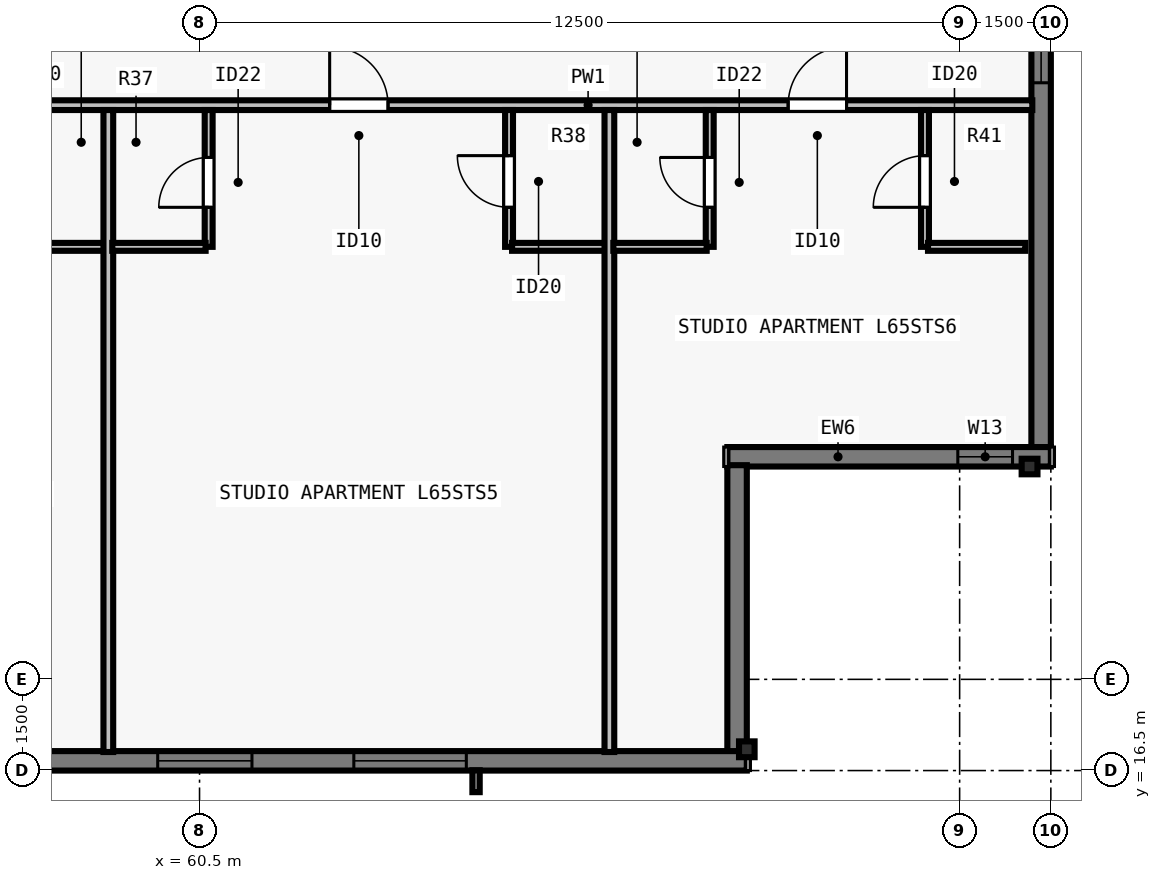
"""IFC4 building model, lengths in metres.
Left out: names, types, materials, properties, quantities, classifications, styles, units other than length and angle.
Written with IfcOpenShell. Run it as: python <this file> out.ifc"""

import sys

from ifc_helpers import new_model, si_unit, direction, frame, frame_2d, origin, origin_2d, place, context, subcontext, project, spatial, rectangle, i_section, extrude, element, fill, save


model = new_model("IFC4")
c1 = context("Model", 3, precision=1e-05, world=origin(), true_north=direction((0.0, 1.0)))
c2 = subcontext(c1, "Body", "Model", "MODEL_VIEW")
j1 = project(units=[si_unit("LENGTHUNIT", "METRE"), si_unit("PLANEANGLEUNIT", "RADIAN")], contexts=[c1])
p1 = place(None, origin())
s1 = spatial("IfcSite", under=j1, at=p1, CompositionType="ELEMENT")
p2 = place(p1, origin())
s2 = spatial("IfcBuilding", under=s1, at=p2, CompositionType="ELEMENT")
p3 = place(p2, frame((0.0, 0.0, 237.5)))
s3 = spatial("IfcBuildingStorey", under=s2, at=p3, CompositionType="ELEMENT", Elevation=237.5)
for number, where, z_axis, x_axis in (
    (1, (69.5, 16.85, 0.0), (0.0, 0.0, 1.0), (1.0, 0.0, 0.0)),
    (2, (74.15, 21.5, 0.0), (0.0, 0.0, 1.0), (0.0, 1.0, 0.0)),
):
    element("IfcColumn", number, at=place(p3, frame(where, z_axis=z_axis, x_axis=x_axis)), inside=s3, PredefinedType="COLUMN", context=c2, shape_type="SweptSolid", body=[
        extrude(i_section(OverallWidth=0.256, OverallDepth=0.26, WebThickness=0.01, FlangeThickness=0.017, FilletRadius=0.013, at=origin_2d()), origin(), (0.0, 0.0, 1.0), 3.5),
    ])
p4 = place(p3, frame((74.34, 56.5, 0.0), z_axis=(0.0, 0.0, 1.0), x_axis=(0.0, -1.0, 0.0)))
e3 = element("IfcWall", 3, at=p4, inside=s3, PredefinedType="SOLIDWALL", context=c2, shape_type="SweptSolid", body=[
    extrude(rectangle(XDim=34.702, YDim=0.32, at=frame_2d((17.351, 0.0))), origin(), (0.0, 0.0, 1.0), 3.29),
])
p5 = place(p4, frame((6.888, 0.0, 0.8)))
e4 = element("IfcOpeningElement", 4, at=p5, cuts=e3, PredefinedType="OPENING", context=c2, shape_type="SweptSolid", body=[
    extrude(rectangle(XDim=1.55, YDim=1.678, at=frame_2d((0.775, 0.839))), frame((0.0, 0.17, 0.0), z_axis=(0.0, -1.0, 0.0), x_axis=(1.0, 0.0, 0.0)), (0.0, 0.0, 1.0), 0.34),
])
p6 = place(p4, frame((10.113, 0.0, 0.8)))
e5 = element("IfcOpeningElement", 5, at=p6, cuts=e3, PredefinedType="OPENING", context=c2, shape_type="SweptSolid", body=[
    extrude(rectangle(XDim=1.85, YDim=1.678, at=frame_2d((0.925, 0.839))), frame((0.0, 0.17, 0.0), z_axis=(0.0, -1.0, 0.0), x_axis=(1.0, 0.0, 0.0)), (0.0, 0.0, 1.0), 0.34),
])
p7 = place(p4, frame((14.888, 0.0, 0.8)))
e6 = element("IfcOpeningElement", 6, at=p7, cuts=e3, PredefinedType="OPENING", context=c2, shape_type="SweptSolid", body=[
    extrude(rectangle(XDim=1.55, YDim=1.678, at=frame_2d((0.775, 0.839))), frame((0.0, 0.17, 0.0), z_axis=(0.0, -1.0, 0.0), x_axis=(1.0, 0.0, 0.0)), (0.0, 0.0, 1.0), 0.34),
])
p8 = place(p4, frame((18.114, 0.0, 0.8)))
e7 = element("IfcOpeningElement", 7, at=p8, cuts=e3, PredefinedType="OPENING", context=c2, shape_type="SweptSolid", body=[
    extrude(rectangle(XDim=1.85, YDim=1.678, at=frame_2d((0.925, 0.839))), frame((0.0, 0.17, 0.0), z_axis=(0.0, -1.0, 0.0), x_axis=(1.0, 0.0, 0.0)), (0.0, 0.0, 1.0), 0.34),
])
p9 = place(p4, frame((23.614, 0.0, 0.8)))
e8 = element("IfcOpeningElement", 8, at=p9, cuts=e3, PredefinedType="OPENING", context=c2, shape_type="SweptSolid", body=[
    extrude(rectangle(XDim=1.85, YDim=1.678, at=frame_2d((0.925, 0.839))), frame((0.0, 0.17, 0.0), z_axis=(0.0, -1.0, 0.0), x_axis=(1.0, 0.0, 0.0)), (0.0, 0.0, 1.0), 0.34),
])
p10 = place(p4, frame((27.139, 0.0, 0.8)))
e9 = element("IfcOpeningElement", 9, at=p10, cuts=e3, PredefinedType="OPENING", context=c2, shape_type="SweptSolid", body=[
    extrude(rectangle(XDim=1.55, YDim=1.678, at=frame_2d((0.775, 0.839))), frame((0.0, 0.17, 0.0), z_axis=(0.0, -1.0, 0.0), x_axis=(1.0, 0.0, 0.0)), (0.0, 0.0, 1.0), 0.34),
])
p11 = place(p3, frame((74.5, 21.66, 0.0), z_axis=(0.0, 0.0, 1.0), x_axis=(-1.0, 0.0, 0.0)))
e10 = element("IfcWall", 10, at=p11, inside=s3, PredefinedType="SOLIDWALL", context=c2, shape_type="SweptSolid", body=[
    extrude(rectangle(XDim=5.32, YDim=0.32, at=frame_2d((2.66, 0.0))), origin(), (0.0, 0.0, 1.0), 3.29),
])
p12 = place(p11, frame((0.63, 0.0, 0.8)))
e11 = element("IfcOpeningElement", 11, at=p12, cuts=e10, PredefinedType="OPENING", context=c2, shape_type="SweptSolid", body=[
    extrude(rectangle(XDim=0.9, YDim=1.678, at=frame_2d((0.45, 0.839))), frame((0.0, 0.17, 0.0), z_axis=(0.0, -1.0, 0.0), x_axis=(1.0, 0.0, 0.0)), (0.0, 0.0, 1.0), 0.34),
])
p13 = place(p3, frame((69.34, 21.522, 0.0), z_axis=(0.0, 0.0, 1.0), x_axis=(0.0, -1.0, 0.0)))
e12 = element("IfcWall", 12, at=p13, inside=s3, PredefinedType="SOLIDWALL", context=c2, shape_type="SweptSolid", body=[
    extrude(rectangle(XDim=4.724, YDim=0.32, at=frame_2d((2.362, 0.0))), origin(), (0.0, 0.0, 1.0), 3.29),
])
p14 = place(p3, frame((69.5, 16.66, 0.0), z_axis=(0.0, 0.0, 1.0), x_axis=(-1.0, 0.0, 0.0)))
e13 = element("IfcWall", 13, at=p14, inside=s3, PredefinedType="SOLIDWALL", context=c2, shape_type="SweptSolid", body=[
    extrude(rectangle(XDim=34.702, YDim=0.32, at=frame_2d((17.351, 0.0))), origin(), (0.0, 0.0, 1.0), 3.29),
])
p15 = place(p14, frame((4.613, 0.0, 0.8)))
e14 = element("IfcOpeningElement", 14, at=p15, cuts=e13, PredefinedType="OPENING", context=c2, shape_type="SweptSolid", body=[
    extrude(rectangle(XDim=1.85, YDim=1.678, at=frame_2d((0.925, 0.839))), frame((0.0, 0.17, 0.0), z_axis=(0.0, -1.0, 0.0), x_axis=(1.0, 0.0, 0.0)), (0.0, 0.0, 1.0), 0.34),
])
p16 = place(p14, frame((8.138, 0.0, 0.8)))
e15 = element("IfcOpeningElement", 15, at=p16, cuts=e13, PredefinedType="OPENING", context=c2, shape_type="SweptSolid", body=[
    extrude(rectangle(XDim=1.55, YDim=1.678, at=frame_2d((0.775, 0.839))), frame((0.0, 0.17, 0.0), z_axis=(0.0, -1.0, 0.0), x_axis=(1.0, 0.0, 0.0)), (0.0, 0.0, 1.0), 0.34),
])
p17 = place(p14, frame((14.888, 0.0, 0.8)))
e16 = element("IfcOpeningElement", 16, at=p17, cuts=e13, PredefinedType="OPENING", context=c2, shape_type="SweptSolid", body=[
    extrude(rectangle(XDim=1.55, YDim=1.678, at=frame_2d((0.775, 0.839))), frame((0.0, 0.17, 0.0), z_axis=(0.0, -1.0, 0.0), x_axis=(1.0, 0.0, 0.0)), (0.0, 0.0, 1.0), 0.34),
])
p18 = place(p14, frame((18.114, 0.0, 0.8)))
e17 = element("IfcOpeningElement", 17, at=p18, cuts=e13, PredefinedType="OPENING", context=c2, shape_type="SweptSolid", body=[
    extrude(rectangle(XDim=1.85, YDim=1.678, at=frame_2d((0.925, 0.839))), frame((0.0, 0.17, 0.0), z_axis=(0.0, -1.0, 0.0), x_axis=(1.0, 0.0, 0.0)), (0.0, 0.0, 1.0), 0.34),
])
p19 = place(p14, frame((25.714, 0.0, 0.8)))
e18 = element("IfcOpeningElement", 18, at=p19, cuts=e13, PredefinedType="OPENING", context=c2, shape_type="SweptSolid", body=[
    extrude(rectangle(XDim=1.85, YDim=1.678, at=frame_2d((0.925, 0.839))), frame((0.0, 0.17, 0.0), z_axis=(0.0, -1.0, 0.0), x_axis=(1.0, 0.0, 0.0)), (0.0, 0.0, 1.0), 0.34),
])
p20 = place(p14, frame((28.389, 0.0, 0.8)))
e19 = element("IfcOpeningElement", 19, at=p20, cuts=e13, PredefinedType="OPENING", context=c2, shape_type="SweptSolid", body=[
    extrude(rectangle(XDim=1.55, YDim=1.678, at=frame_2d((0.775, 0.839))), frame((0.0, 0.17, 0.0), z_axis=(0.0, -1.0, 0.0), x_axis=(1.0, 0.0, 0.0)), (0.0, 0.0, 1.0), 0.34),
])
p21 = place(p3, frame((29.805, 27.442, 0.0), z_axis=(0.0, 0.0, 1.0), x_axis=(1.0, 0.0, 0.0)))
e20 = element("IfcWall", 20, at=p21, inside=s3, PredefinedType="PARTITIONING", context=c2, shape_type="SweptSolid", body=[
    extrude(rectangle(XDim=44.39, YDim=0.16, at=frame_2d((22.195, 0.0))), origin(), (0.0, 0.0, 1.0), 2.958),
])
p22 = place(p21, frame((3.575, 0.0, 0.0)))
e21 = element("IfcOpeningElement", 21, at=p22, cuts=e20, PredefinedType="OPENING", context=c2, shape_type="SweptSolid", body=[
    extrude(rectangle(XDim=0.96, YDim=2.18, at=frame_2d((0.48, 1.09))), frame((0.0, 0.09, 0.0), z_axis=(0.0, -1.0, 0.0), x_axis=(1.0, 0.0, 0.0)), (0.0, 0.0, 1.0), 0.18),
])
p23 = place(p21, frame((10.755, 0.0, 0.0)))
e22 = element("IfcOpeningElement", 22, at=p23, cuts=e20, PredefinedType="OPENING", context=c2, shape_type="SweptSolid", body=[
    extrude(rectangle(XDim=0.96, YDim=2.18, at=frame_2d((0.48, 1.09))), frame((0.0, 0.09, 0.0), z_axis=(0.0, -1.0, 0.0), x_axis=(1.0, 0.0, 0.0)), (0.0, 0.0, 1.0), 0.18),
])
p24 = place(p21, frame((18.115, 0.0, 0.0)))
e23 = element("IfcOpeningElement", 23, at=p24, cuts=e20, PredefinedType="OPENING", context=c2, shape_type="SweptSolid", body=[
    extrude(rectangle(XDim=0.96, YDim=2.18, at=frame_2d((0.48, 1.09))), frame((0.0, 0.09, 0.0), z_axis=(0.0, -1.0, 0.0), x_axis=(1.0, 0.0, 0.0)), (0.0, 0.0, 1.0), 0.18),
])
p25 = place(p21, frame((25.475, 0.0, 0.0)))
e24 = element("IfcOpeningElement", 24, at=p25, cuts=e20, PredefinedType="OPENING", context=c2, shape_type="SweptSolid", body=[
    extrude(rectangle(XDim=0.96, YDim=2.18, at=frame_2d((0.48, 1.09))), frame((0.0, 0.09, 0.0), z_axis=(0.0, -1.0, 0.0), x_axis=(1.0, 0.0, 0.0)), (0.0, 0.0, 1.0), 0.18),
])
p26 = place(p21, frame((32.835, 0.0, 0.0)))
e25 = element("IfcOpeningElement", 25, at=p26, cuts=e20, PredefinedType="OPENING", context=c2, shape_type="SweptSolid", body=[
    extrude(rectangle(XDim=0.96, YDim=2.18, at=frame_2d((0.48, 1.09))), frame((0.0, 0.09, 0.0), z_axis=(0.0, -1.0, 0.0), x_axis=(1.0, 0.0, 0.0)), (0.0, 0.0, 1.0), 0.18),
])
p27 = place(p21, frame((40.375, 0.0, 0.0)))
e26 = element("IfcOpeningElement", 26, at=p27, cuts=e20, PredefinedType="OPENING", context=c2, shape_type="SweptSolid", body=[
    extrude(rectangle(XDim=0.96, YDim=2.18, at=frame_2d((0.48, 1.09))), frame((0.0, 0.09, 0.0), z_axis=(0.0, -1.0, 0.0), x_axis=(1.0, 0.0, 0.0)), (0.0, 0.0, 1.0), 0.18),
])
p28 = place(p3, frame((57.4, 25.113, 0.0), z_axis=(0.0, 0.0, 1.0), x_axis=(1.0, 0.0, 0.0)))
e27 = element("IfcWall", 27, at=p28, inside=s3, PredefinedType="PLUMBINGWALL", context=c2, shape_type="SweptSolid", body=[
    extrude(rectangle(XDim=1.6, YDim=0.13, at=frame_2d((0.8, 0.0))), origin(), (0.0, 0.0, 1.0), 3.29),
])
p29 = place(p3, frame((59.0, 16.805, 0.0), z_axis=(0.0, 0.0, 1.0), x_axis=(0.0, 1.0, 0.0)))
e28 = element("IfcWall", 28, at=p29, inside=s3, PredefinedType="PARTITIONING", context=c2, shape_type="SweptSolid", body=[
    extrude(rectangle(XDim=10.558, YDim=0.16, at=frame_2d((5.279, 0.0))), origin(), (0.0, 0.0, 1.0), 3.29),
])
p30 = place(p3, frame((60.65, 25.113, 0.0), z_axis=(0.0, 0.0, 1.0), x_axis=(0.0, 1.0, 0.0)))
e29 = element("IfcWall", 29, at=p30, inside=s3, PredefinedType="PLUMBINGWALL", context=c2, shape_type="SweptSolid", body=[
    extrude(rectangle(XDim=2.25, YDim=0.13, at=frame_2d((1.125, 0.0))), origin(), (0.0, 0.0, 1.0), 3.29),
])
p31 = place(p30, frame((0.65, 0.0, 0.0)))
e30 = element("IfcOpeningElement", 30, at=p31, cuts=e29, PredefinedType="OPENING", context=c2, shape_type="SweptSolid", body=[
    extrude(rectangle(XDim=0.82, YDim=2.1, at=frame_2d((0.41, 1.05))), frame((0.0, 0.075, 0.0), z_axis=(0.0, -1.0, 0.0), x_axis=(1.0, 0.0, 0.0)), (0.0, 0.0, 1.0), 0.15),
])
p32 = place(p3, frame((59.065, 25.113, 0.0), z_axis=(0.0, 0.0, 1.0), x_axis=(1.0, 0.0, 0.0)))
e31 = element("IfcWall", 31, at=p32, inside=s3, PredefinedType="PLUMBINGWALL", context=c2, shape_type="SweptSolid", body=[
    extrude(rectangle(XDim=1.535, YDim=0.13, at=frame_2d((0.768, 0.0))), origin(), (0.0, 0.0, 1.0), 3.29),
])
p33 = place(p3, frame((65.59, 25.113, 0.0), z_axis=(0.0, 0.0, 1.0), x_axis=(0.0, 1.0, 0.0)))
e32 = element("IfcWall", 32, at=p33, inside=s3, PredefinedType="PLUMBINGWALL", context=c2, shape_type="SweptSolid", body=[
    extrude(rectangle(XDim=2.25, YDim=0.13, at=frame_2d((1.125, 0.0))), origin(), (0.0, 0.0, 1.0), 3.29),
])
p34 = place(p33, frame((0.65, 0.0, 0.0)))
e33 = element("IfcOpeningElement", 33, at=p34, cuts=e32, PredefinedType="OPENING", context=c2, shape_type="SweptSolid", body=[
    extrude(rectangle(XDim=0.85, YDim=2.1, at=frame_2d((0.425, 1.05))), frame((0.0, 0.075, 0.0), z_axis=(0.0, -1.0, 0.0), x_axis=(1.0, 0.0, 0.0)), (0.0, 0.0, 1.0), 0.15),
])
p35 = place(p3, frame((65.64, 25.113, 0.0), z_axis=(0.0, 0.0, 1.0), x_axis=(1.0, 0.0, 0.0)))
e34 = element("IfcWall", 34, at=p35, inside=s3, PredefinedType="PLUMBINGWALL", context=c2, shape_type="SweptSolid", body=[
    extrude(rectangle(XDim=1.6, YDim=0.13, at=frame_2d((0.8, 0.0))), origin(), (0.0, 0.0, 1.0), 3.29),
])
p36 = place(p3, frame((67.24, 16.805, 0.0), z_axis=(0.0, 0.0, 1.0), x_axis=(0.0, 1.0, 0.0)))
e35 = element("IfcWall", 35, at=p36, inside=s3, PredefinedType="PARTITIONING", context=c2, shape_type="SweptSolid", body=[
    extrude(rectangle(XDim=10.558, YDim=0.16, at=frame_2d((5.279, 0.0))), origin(), (0.0, 0.0, 1.0), 2.573),
])
p37 = place(p3, frame((68.89, 25.113, 0.0), z_axis=(0.0, 0.0, 1.0), x_axis=(0.0, 1.0, 0.0)))
e36 = element("IfcWall", 36, at=p37, inside=s3, PredefinedType="PLUMBINGWALL", context=c2, shape_type="SweptSolid", body=[
    extrude(rectangle(XDim=2.25, YDim=0.13, at=frame_2d((1.125, 0.0))), origin(), (0.0, 0.0, 1.0), 3.29),
])
p38 = place(p37, frame((0.65, 0.0, 0.0)))
e37 = element("IfcOpeningElement", 37, at=p38, cuts=e36, PredefinedType="OPENING", context=c2, shape_type="SweptSolid", body=[
    extrude(rectangle(XDim=0.82, YDim=2.1, at=frame_2d((0.41, 1.05))), frame((0.0, 0.075, 0.0), z_axis=(0.0, -1.0, 0.0), x_axis=(1.0, 0.0, 0.0)), (0.0, 0.0, 1.0), 0.15),
])
p39 = place(p3, frame((67.305, 25.113, 0.0), z_axis=(0.0, 0.0, 1.0), x_axis=(1.0, 0.0, 0.0)))
e38 = element("IfcWall", 38, at=p39, inside=s3, PredefinedType="PLUMBINGWALL", context=c2, shape_type="SweptSolid", body=[
    extrude(rectangle(XDim=1.535, YDim=0.13, at=frame_2d((0.768, 0.0))), origin(), (0.0, 0.0, 1.0), 2.958),
])
p40 = place(p3, frame((72.43, 25.113, 0.0), z_axis=(0.0, 0.0, 1.0), x_axis=(0.0, 1.0, 0.0)))
e39 = element("IfcWall", 39, at=p40, inside=s3, PredefinedType="PLUMBINGWALL", context=c2, shape_type="SweptSolid", body=[
    extrude(rectangle(XDim=2.25, YDim=0.13, at=frame_2d((1.125, 0.0))), origin(), (0.0, 0.0, 1.0), 3.29),
])
p41 = place(p40, frame((0.65, 0.0, 0.0)))
e40 = element("IfcOpeningElement", 40, at=p41, cuts=e39, PredefinedType="OPENING", context=c2, shape_type="SweptSolid", body=[
    extrude(rectangle(XDim=0.85, YDim=2.1, at=frame_2d((0.425, 1.05))), frame((0.0, 0.075, 0.0), z_axis=(0.0, -1.0, 0.0), x_axis=(1.0, 0.0, 0.0)), (0.0, 0.0, 1.0), 0.15),
])
p42 = place(p3, frame((72.48, 25.113, 0.0), z_axis=(0.0, 0.0, 1.0), x_axis=(1.0, 0.0, 0.0)))
e41 = element("IfcWall", 41, at=p42, inside=s3, PredefinedType="PLUMBINGWALL", context=c2, shape_type="SweptSolid", body=[
    extrude(rectangle(XDim=1.6, YDim=0.13, at=frame_2d((0.8, 0.0))), origin(), (0.0, 0.0, 1.0), 3.29),
])
p43 = place(p10, origin())
e42 = element("IfcWindow", 42, at=p43, inside=s3, PartitioningType="SINGLE_PANEL", PredefinedType="WINDOW", context=c2, shape_type="SweptSolid", body=[
    extrude(rectangle(XDim=1.55, YDim=1.678, at=frame_2d((0.775, 0.839))), frame((0.0, -0.05, 0.0), z_axis=(0.0, -1.0, 0.0), x_axis=(1.0, 0.0, 0.0)), (0.0, 0.0, 1.0), 0.06),
])
fill(e9, e42)
p44 = place(p15, origin())
e43 = element("IfcWindow", 43, at=p44, inside=s3, PartitioningType="SINGLE_PANEL", PredefinedType="WINDOW", context=c2, shape_type="SweptSolid", body=[
    extrude(rectangle(XDim=1.85, YDim=1.678, at=frame_2d((0.925, 0.839))), frame((0.0, -0.05, 0.0), z_axis=(0.0, -1.0, 0.0), x_axis=(1.0, 0.0, 0.0)), (0.0, 0.0, 1.0), 0.06),
])
fill(e14, e43)
p45 = place(p16, origin())
e44 = element("IfcWindow", 44, at=p45, inside=s3, PartitioningType="SINGLE_PANEL", PredefinedType="WINDOW", context=c2, shape_type="SweptSolid", body=[
    extrude(rectangle(XDim=1.55, YDim=1.678, at=frame_2d((0.775, 0.839))), frame((0.0, -0.05, 0.0), z_axis=(0.0, -1.0, 0.0), x_axis=(1.0, 0.0, 0.0)), (0.0, 0.0, 1.0), 0.06),
])
fill(e15, e44)
p46 = place(p12, origin())
e45 = element("IfcWindow", 45, at=p46, inside=s3, PartitioningType="SINGLE_PANEL", PredefinedType="WINDOW", context=c2, shape_type="SweptSolid", body=[
    extrude(rectangle(XDim=0.9, YDim=1.678, at=frame_2d((0.45, 0.839))), frame((0.0, -0.04, 0.0), z_axis=(0.0, -1.0, 0.0), x_axis=(1.0, 0.0, 0.0)), (0.0, 0.0, 1.0), 0.06),
])
fill(e11, e45)
p47 = place(p31, origin())
e46 = element("IfcDoor", 46, at=p47, inside=s3, OperationType="SINGLE_SWING_LEFT", PredefinedType="DOOR", context=c2, shape_type="SweptSolid", body=[
    extrude(rectangle(XDim=0.82, YDim=2.1, at=frame_2d((0.41, 1.05))), frame((0.0, 0.025, 0.0), z_axis=(0.0, -1.0, 0.0), x_axis=(1.0, 0.0, 0.0)), (0.0, 0.0, 1.0), 0.05),
])
fill(e30, e46)
p48 = place(p34, origin())
e47 = element("IfcDoor", 47, at=p48, inside=s3, OperationType="SINGLE_SWING_RIGHT", PredefinedType="DOOR", context=c2, shape_type="SweptSolid", body=[
    extrude(rectangle(XDim=0.85, YDim=2.1, at=frame_2d((0.425, 1.05))), frame((0.0, 0.025, 0.0), z_axis=(0.0, -1.0, 0.0), x_axis=(1.0, 0.0, 0.0)), (0.0, 0.0, 1.0), 0.05),
])
fill(e33, e47)
p49 = place(p26, origin())
e48 = element("IfcDoor", 48, at=p49, inside=s3, OperationType="SINGLE_SWING_LEFT", PredefinedType="DOOR", context=c2, shape_type="SweptSolid", body=[
    extrude(rectangle(XDim=0.96, YDim=2.18, at=frame_2d((0.48, 1.09))), frame((0.0, 0.025, 0.0), z_axis=(0.0, -1.0, 0.0), x_axis=(1.0, 0.0, 0.0)), (0.0, 0.0, 1.0), 0.05),
])
fill(e25, e48)
p50 = place(p38, origin())
e49 = element("IfcDoor", 49, at=p50, inside=s3, OperationType="SINGLE_SWING_RIGHT", PredefinedType="DOOR", context=c2, shape_type="SweptSolid", body=[
    extrude(rectangle(XDim=0.82, YDim=2.1, at=frame_2d((0.41, 1.05))), frame((0.0, 0.025, 0.0), z_axis=(0.0, -1.0, 0.0), x_axis=(1.0, 0.0, 0.0)), (0.0, 0.0, 1.0), 0.05),
])
fill(e37, e49)
p51 = place(p41, origin())
e50 = element("IfcDoor", 50, at=p51, inside=s3, OperationType="SINGLE_SWING_LEFT", PredefinedType="DOOR", context=c2, shape_type="SweptSolid", body=[
    extrude(rectangle(XDim=0.85, YDim=2.1, at=frame_2d((0.425, 1.05))), frame((0.0, 0.025, 0.0), z_axis=(0.0, -1.0, 0.0), x_axis=(1.0, 0.0, 0.0)), (0.0, 0.0, 1.0), 0.05),
])
fill(e40, e50)
p52 = place(p27, origin())
e51 = element("IfcDoor", 51, at=p52, inside=s3, OperationType="SINGLE_SWING_RIGHT", PredefinedType="DOOR", context=c2, shape_type="SweptSolid", body=[
    extrude(rectangle(XDim=0.96, YDim=2.18, at=frame_2d((0.48, 1.09))), frame((0.0, 0.025, 0.0), z_axis=(0.0, -1.0, 0.0), x_axis=(1.0, 0.0, 0.0)), (0.0, 0.0, 1.0), 0.05),
])
fill(e26, e51)
save(model, sys.argv[1])
